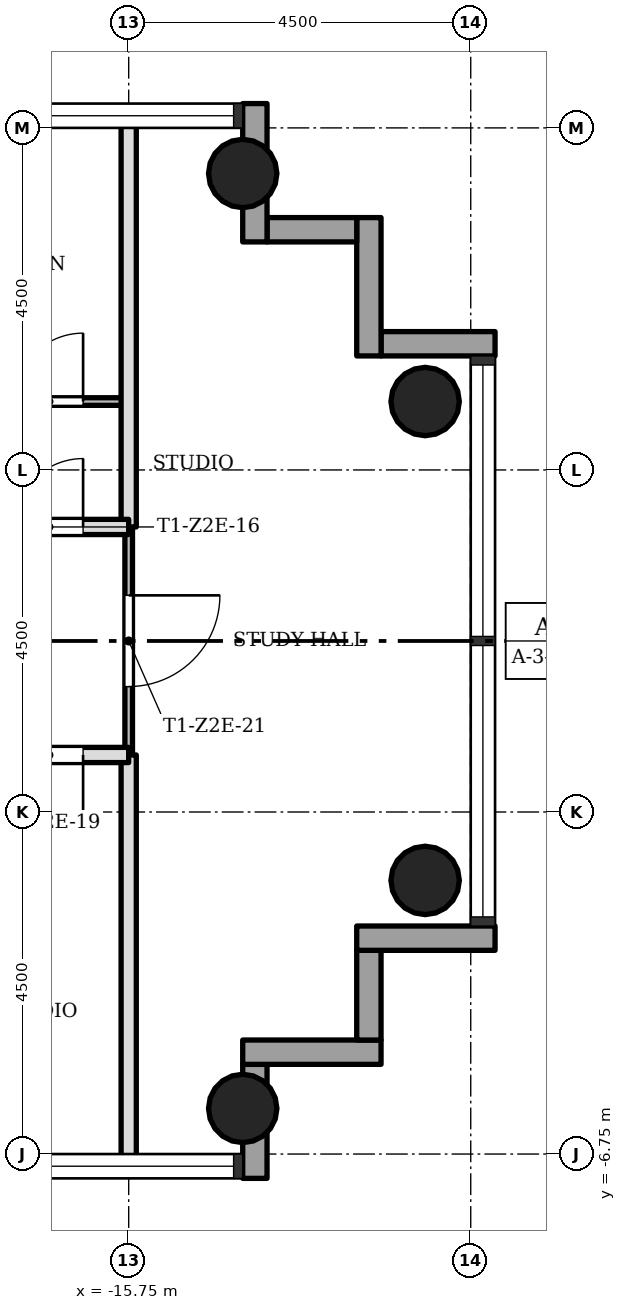
"""IFC4 building model, lengths in metres.
Left out: names, types, materials, properties, quantities, classifications, styles, units other than length and angle.
Written with IfcOpenShell. Run it as: python <this file> out.ifc"""

import sys

from ifc_helpers import new_model, si_unit, direction, frame, frame_2d, origin, origin_2d, place, context, subcontext, project, spatial, rectangle, hollow_circle, extrude, element, fill, save


model = new_model("IFC4")
c1 = context("Model", 3, precision=1e-05, world=origin(), true_north=direction((0.0, 1.0)))
c2 = subcontext(c1, "Body", "Model", "MODEL_VIEW")
j1 = project(units=[si_unit("LENGTHUNIT", "METRE"), si_unit("PLANEANGLEUNIT", "RADIAN")], contexts=[c1])
p1 = place(None, origin())
s1 = spatial("IfcSite", under=j1, at=p1, CompositionType="ELEMENT")
p2 = place(p1, origin())
s2 = spatial("IfcBuilding", under=s1, at=p2, CompositionType="ELEMENT")
p3 = place(p2, frame((0.0, 0.0, 97.0)))
s3 = spatial("IfcBuildingStorey", under=s2, at=p3, CompositionType="ELEMENT", Elevation=97.0)
for number, where, z_axis, x_axis in (
    (1, (-14.25, -6.15, 0.0), (0.0, 0.0, 1.0), (1.0, 0.0, 0.0)),
    (2, (-14.25, 6.15, 0.0), (0.0, 0.0, 1.0), (1.0, 0.0, 0.0)),
    (3, (-11.85, -3.15, 0.0), (0.0, 0.0, 1.0), (1.0, 0.0, 0.0)),
    (4, (-11.85, 3.15, 0.0), (0.0, 0.0, 1.0), (1.0, 0.0, 0.0)),
):
    element("IfcColumn", number, at=place(p3, frame(where, z_axis=z_axis, x_axis=x_axis)), inside=s3, PredefinedType="COLUMN", context=c2, shape_type="SweptSolid", body=[
        extrude(hollow_circle(Radius=0.45, WallThickness=0.032, at=origin_2d()), origin(), (0.0, 0.0, 1.0), 3.4),
    ])
p4 = place(p3, frame((-14.09, -7.07, -0.3), z_axis=(0.0, 0.0, 1.0), x_axis=(0.0, 1.0, 0.0)))
e5 = element("IfcWall", 5, at=p4, inside=s3, PredefinedType="STANDARD", context=c2, shape_type="SweptSolid", body=[
    extrude(rectangle(XDim=1.5, YDim=0.32, at=frame_2d((0.75, 0.0))), origin(), (0.0, 0.0, 1.0), 3.4),
])
p5 = place(p3, frame((-14.25, -5.41, -0.3), z_axis=(0.0, 0.0, 1.0), x_axis=(1.0, 0.0, 0.0)))
e6 = element("IfcWall", 6, at=p5, inside=s3, PredefinedType="STANDARD", context=c2, shape_type="SweptSolid", body=[
    extrude(rectangle(XDim=1.82, YDim=0.32, at=frame_2d((0.91, 0.0))), origin(), (0.0, 0.0, 1.0), 3.4),
])
p6 = place(p3, frame((-12.59, -5.25, -0.3), z_axis=(0.0, 0.0, 1.0), x_axis=(0.0, 1.0, 0.0)))
e7 = element("IfcWall", 7, at=p6, inside=s3, PredefinedType="STANDARD", context=c2, shape_type="SweptSolid", body=[
    extrude(rectangle(XDim=1.18, YDim=0.32, at=frame_2d((0.59, 0.0))), origin(), (0.0, 0.0, 1.0), 3.4),
])
p7 = place(p3, frame((-12.75, -3.91, -0.3), z_axis=(0.0, 0.0, 1.0), x_axis=(1.0, 0.0, 0.0)))
e8 = element("IfcWall", 8, at=p7, inside=s3, PredefinedType="STANDARD", context=c2, shape_type="SweptSolid", body=[
    extrude(rectangle(XDim=1.82, YDim=0.32, at=frame_2d((0.91, 0.0))), origin(), (0.0, 0.0, 1.0), 3.4),
])
p8 = place(p3, frame((-10.93, 3.91, -0.3), z_axis=(0.0, 0.0, 1.0), x_axis=(-1.0, 0.0, 0.0)))
e9 = element("IfcWall", 9, at=p8, inside=s3, PredefinedType="STANDARD", context=c2, shape_type="SweptSolid", body=[
    extrude(rectangle(XDim=1.5, YDim=0.32, at=frame_2d((0.75, 0.0))), origin(), (0.0, 0.0, 1.0), 3.4),
])
p9 = place(p3, frame((-12.59, 3.75, -0.3), z_axis=(0.0, 0.0, 1.0), x_axis=(0.0, 1.0, 0.0)))
e10 = element("IfcWall", 10, at=p9, inside=s3, PredefinedType="STANDARD", context=c2, shape_type="SweptSolid", body=[
    extrude(rectangle(XDim=1.82, YDim=0.32, at=frame_2d((0.91, 0.0))), origin(), (0.0, 0.0, 1.0), 3.4),
])
p10 = place(p3, frame((-12.75, 5.41, -0.3), z_axis=(0.0, 0.0, 1.0), x_axis=(-1.0, 0.0, 0.0)))
e11 = element("IfcWall", 11, at=p10, inside=s3, PredefinedType="STANDARD", context=c2, shape_type="SweptSolid", body=[
    extrude(rectangle(XDim=1.18, YDim=0.32, at=frame_2d((0.59, 0.0))), origin(), (0.0, 0.0, 1.0), 3.4),
])
p11 = place(p3, frame((-14.09, 5.25, -0.3), z_axis=(0.0, 0.0, 1.0), x_axis=(0.0, 1.0, 0.0)))
e12 = element("IfcWall", 12, at=p11, inside=s3, PredefinedType="STANDARD", context=c2, shape_type="SweptSolid", body=[
    extrude(rectangle(XDim=1.82, YDim=0.32, at=frame_2d((0.91, 0.0))), origin(), (0.0, 0.0, 1.0), 3.4),
])
p12 = place(p3, frame((-15.75, -1.5, 0.0), z_axis=(0.0, 0.0, 1.0), x_axis=(0.0, 1.0, 0.0)))
e13 = element("IfcWall", 13, at=p12, inside=s3, PredefinedType="PARTITIONING", context=c2, shape_type="SweptSolid", body=[
    extrude(rectangle(XDim=3.0, YDim=0.1, at=frame_2d((1.5, 0.0))), origin(), (0.0, 0.0, 1.0), 3.0),
])
p13 = place(p12, frame((0.9, 0.0, 0.0)))
e14 = element("IfcOpeningElement", 14, at=p13, cuts=e13, PredefinedType="OPENING", context=c2, shape_type="SweptSolid", body=[
    extrude(rectangle(XDim=1.2, YDim=2.1, at=frame_2d((0.6, 1.05))), frame((0.0, 0.06, 0.0), z_axis=(0.0, -1.0, 0.0), x_axis=(1.0, 0.0, 0.0)), (0.0, 0.0, 1.0), 0.12),
])
for number, where, z_axis, x_axis in (
    (15, (-15.75, -6.85, 0.0), (0.0, 0.0, 1.0), (0.0, 1.0, 0.0)),
    (16, (-15.75, 1.5, 0.0), (0.0, 0.0, 1.0), (0.0, 1.0, 0.0)),
):
    element("IfcWall", number, at=place(p3, frame(where, z_axis=z_axis, x_axis=x_axis)), inside=s3, PredefinedType="SOLIDWALL", context=c2, shape_type="SweptSolid", body=[
        extrude(rectangle(XDim=5.35, YDim=0.2, at=frame_2d((2.675, 0.0))), origin(), (0.0, 0.0, 1.0), 3.0),
    ])
p14 = place(p3, frame((-20.25, -1.5, 0.0), z_axis=(0.0, 0.0, 1.0), x_axis=(1.0, 0.0, 0.0)))
e17 = element("IfcWall", 17, at=p14, inside=s3, PredefinedType="SOLIDWALL", context=c2, shape_type="SweptSolid", body=[
    extrude(rectangle(XDim=4.5, YDim=0.2, at=frame_2d((2.25, 0.0))), origin(), (0.0, 0.0, 1.0), 3.0),
])
p15 = place(p14, frame((3.0, 0.0, 0.0)))
e18 = element("IfcOpeningElement", 18, at=p15, cuts=e17, PredefinedType="OPENING", context=c2, shape_type="SweptSolid", body=[
    extrude(rectangle(XDim=0.9, YDim=2.1, at=frame_2d((0.45, 1.05))), frame((0.0, 0.11, 0.0), z_axis=(0.0, -1.0, 0.0), x_axis=(1.0, 0.0, 0.0)), (0.0, 0.0, 1.0), 0.22),
])
p16 = place(p3, frame((-20.25, 1.5, 0.0), z_axis=(0.0, 0.0, 1.0), x_axis=(1.0, 0.0, 0.0)))
e19 = element("IfcWall", 19, at=p16, inside=s3, PredefinedType="SOLIDWALL", context=c2, shape_type="SweptSolid", body=[
    extrude(rectangle(XDim=4.5, YDim=0.2, at=frame_2d((2.25, 0.0))), origin(), (0.0, 0.0, 1.0), 3.0),
])
p17 = place(p16, frame((3.0, 0.0, 0.0)))
e20 = element("IfcOpeningElement", 20, at=p17, cuts=e19, PredefinedType="OPENING", context=c2, shape_type="SweptSolid", body=[
    extrude(rectangle(XDim=0.9, YDim=2.1, at=frame_2d((0.45, 1.05))), frame((0.0, 0.11, 0.0), z_axis=(0.0, -1.0, 0.0), x_axis=(1.0, 0.0, 0.0)), (0.0, 0.0, 1.0), 0.22),
])
p18 = place(p3, frame((-20.25, 3.15, 0.0), z_axis=(0.0, 0.0, 1.0), x_axis=(1.0, 0.0, 0.0)))
e21 = element("IfcWall", 21, at=p18, inside=s3, PredefinedType="PARTITIONING", context=c2, shape_type="SweptSolid", body=[
    extrude(rectangle(XDim=4.5, YDim=0.1, at=frame_2d((2.25, 0.0))), origin(), (0.0, 0.0, 1.0), 3.0),
])
p19 = place(p18, frame((3.0, 0.0, 0.0)))
e22 = element("IfcOpeningElement", 22, at=p19, cuts=e21, PredefinedType="OPENING", context=c2, shape_type="SweptSolid", body=[
    extrude(rectangle(XDim=0.9, YDim=2.1, at=frame_2d((0.45, 1.05))), frame((0.0, 0.06, 0.0), z_axis=(0.0, -1.0, 0.0), x_axis=(1.0, 0.0, 0.0)), (0.0, 0.0, 1.0), 0.12),
])
p20 = place(p17, origin())
e23 = element("IfcDoor", 23, at=p20, inside=s3, OperationType="SINGLE_SWING_LEFT", PredefinedType="DOOR", context=c2, shape_type="SweptSolid", body=[
    extrude(rectangle(XDim=0.9, YDim=2.1, at=frame_2d((0.45, 1.05))), frame((0.0, 0.025, 0.0), z_axis=(0.0, -1.0, 0.0), x_axis=(1.0, 0.0, 0.0)), (0.0, 0.0, 1.0), 0.05),
])
fill(e20, e23)
p21 = place(p19, origin())
e24 = element("IfcDoor", 24, at=p21, inside=s3, OperationType="SINGLE_SWING_LEFT", PredefinedType="DOOR", context=c2, shape_type="SweptSolid", body=[
    extrude(rectangle(XDim=0.9, YDim=2.1, at=frame_2d((0.45, 1.05))), frame((0.0, 0.025, 0.0), z_axis=(0.0, -1.0, 0.0), x_axis=(1.0, 0.0, 0.0)), (0.0, 0.0, 1.0), 0.05),
])
fill(e22, e24)
p22 = place(p15, origin())
e25 = element("IfcDoor", 25, at=p22, inside=s3, OperationType="SINGLE_SWING_RIGHT", PredefinedType="DOOR", context=c2, shape_type="SweptSolid", body=[
    extrude(rectangle(XDim=0.9, YDim=2.1, at=frame_2d((0.45, 1.05))), frame((0.0, 0.025, 0.0), z_axis=(0.0, -1.0, 0.0), x_axis=(1.0, 0.0, 0.0)), (0.0, 0.0, 1.0), 0.05),
])
fill(e18, e25)
p23 = place(p13, origin())
e26 = element("IfcDoor", 26, at=p23, inside=s3, OperationType="SINGLE_SWING_RIGHT", PredefinedType="DOOR", context=c2, shape_type="SweptSolid", body=[
    extrude(rectangle(XDim=1.2, YDim=2.1, at=frame_2d((0.6, 1.05))), frame((0.0, 0.025, 0.0), z_axis=(0.0, -1.0, 0.0), x_axis=(1.0, 0.0, 0.0)), (0.0, 0.0, 1.0), 0.05),
])
fill(e14, e26)
save(model, sys.argv[1])
